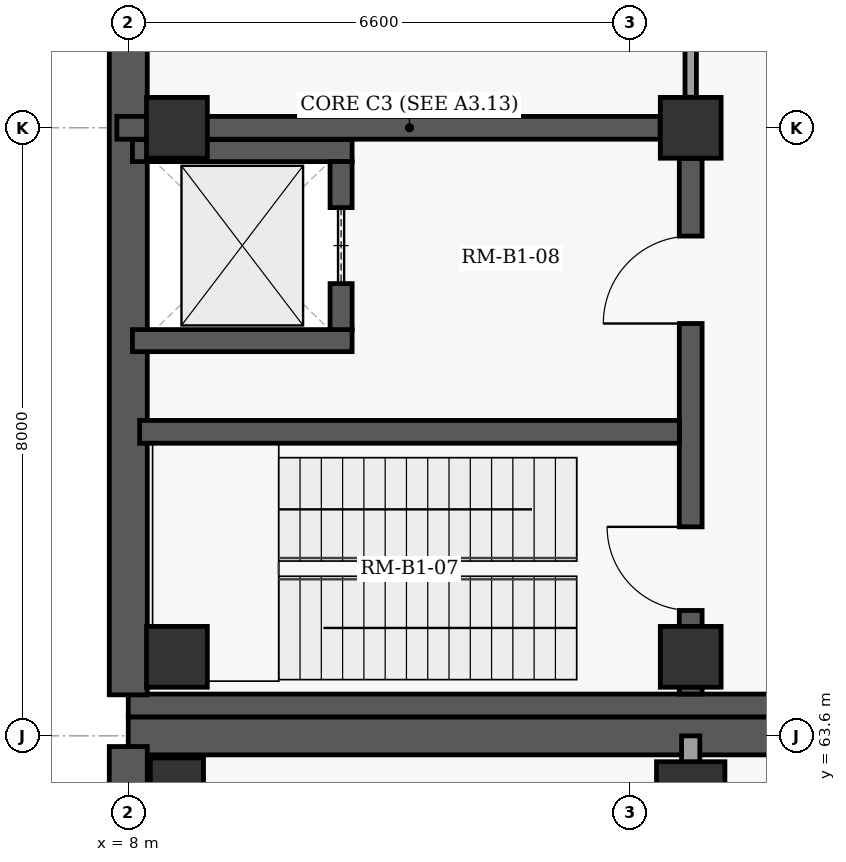
"""IFC4 building model, lengths in metres.
Left out: names, types, materials, properties, quantities, classifications, styles, units other than length and angle.
Written with IfcOpenShell. Run it as: python <this file> out.ifc"""

import sys

from ifc_helpers import new_model, si_unit, direction, frame, frame_2d, origin, origin_2d, place, context, subcontext, project, spatial, rectangle, extrude, element, fill, save


model = new_model("IFC4")
c1 = context("Model", 3, precision=1e-05, world=origin(), true_north=direction((0.0, 1.0)))
c2 = subcontext(c1, "Body", "Model", "MODEL_VIEW")
j1 = project(units=[si_unit("LENGTHUNIT", "METRE"), si_unit("PLANEANGLEUNIT", "RADIAN")], contexts=[c1])
p1 = place(None, origin())
s1 = spatial("IfcSite", under=j1, at=p1, CompositionType="ELEMENT")
p2 = place(p1, origin())
s2 = spatial("IfcBuilding", under=s1, at=p2, CompositionType="ELEMENT")
p3 = place(p2, frame((0.0, 0.0, -4.8)))
s3 = spatial("IfcBuildingStorey", under=s2, at=p3, CompositionType="ELEMENT", Elevation=-4.8)
p4 = place(p3, frame((8.64, 62.96, 0.0), z_axis=(0.0, 0.0, 1.0), x_axis=(1.0, 0.0, 0.0)))
e1 = element("IfcColumn", 1, at=p4, inside=s3, PredefinedType="COLUMN", context=c2, shape_type="SweptSolid", body=[
    extrude(rectangle(XDim=0.7, YDim=0.7, at=origin_2d()), origin(), (0.0, 0.0, 1.0), 4.8),
])
p5 = place(p3, frame((15.4, 62.96, 0.0), z_axis=(0.0, 0.0, 1.0), x_axis=(1.0, 0.0, 0.0)))
e2 = element("IfcColumn", 2, at=p5, inside=s3, PredefinedType="COLUMN", context=c2, shape_type="SweptSolid", body=[
    extrude(rectangle(XDim=0.6, YDim=0.9, at=origin_2d()), origin(), (0.0, 0.0, 1.0), 4.8),
])
for number, where, z_axis, x_axis in (
    (3, (8.64, 64.64, 0.0), (0.0, 0.0, 1.0), (1.0, 0.0, 0.0)),
    (4, (8.64, 71.6, 0.0), (0.0, 0.0, 1.0), (1.0, 0.0, 0.0)),
    (5, (15.4, 64.64, 0.0), (0.0, 0.0, 1.0), (1.0, 0.0, 0.0)),
    (6, (15.4, 71.6, 0.0), (0.0, 0.0, 1.0), (1.0, 0.0, 0.0)),
):
    element("IfcColumn", number, at=place(p3, frame(where, z_axis=z_axis, x_axis=x_axis)), inside=s3, PredefinedType="COLUMN", context=c2, shape_type="SweptSolid", body=[
        extrude(rectangle(XDim=0.8, YDim=0.8, at=origin_2d()), origin(), (0.0, 0.0, 1.0), 4.8),
    ])
p6 = place(p3, frame((8.0, 63.6, 0.0), z_axis=(0.0, 0.0, 1.0), x_axis=(1.0, 0.0, 0.0)))
e7 = element("IfcWall", 7, at=p6, inside=s3, PredefinedType="USERDEFINED", context=c2, shape_type="SweptSolid", body=[
    extrude(rectangle(XDim=38.0, YDim=0.5, at=frame_2d((19.0, 0.0))), origin(), (0.0, 0.0, 1.0), 4.5),
])
p7 = place(p3, frame((8.0, 7.74, 0.0), z_axis=(0.0, 0.0, 1.0), x_axis=(0.0, 1.0, 0.0)))
e8 = element("IfcWall", 8, at=p7, inside=s3, PredefinedType="USERDEFINED", context=c2, shape_type="SweptSolid", body=[
    extrude(rectangle(XDim=55.72, YDim=0.5, at=frame_2d((27.86, 0.0))), origin(), (0.0, 0.0, 1.0), 4.5),
])
p8 = place(p3, frame((40.2, 64.0, 0.0), z_axis=(0.0, 0.0, 1.0), x_axis=(-1.0, 0.0, 0.0)))
e9 = element("IfcWall", 9, at=p8, inside=s3, PredefinedType="SHEAR", context=c2, shape_type="SweptSolid", body=[
    extrude(rectangle(XDim=32.2, YDim=0.3, at=frame_2d((16.1, 0.0))), origin(), (0.0, 0.0, 1.0), 4.5),
])
p9 = place(p3, frame((8.0, 64.14, 0.0), z_axis=(0.0, 0.0, 1.0), x_axis=(0.0, 1.0, 0.0)))
e10 = element("IfcWall", 10, at=p9, inside=s3, PredefinedType="USERDEFINED", context=c2, shape_type="SweptSolid", body=[
    extrude(rectangle(XDim=29.72, YDim=0.5, at=frame_2d((14.86, 0.0))), origin(), (0.0, 0.0, 1.0), 4.5),
])
p10 = place(p3, frame((7.85, 71.6, 0.0), z_axis=(0.0, 0.0, 1.0), x_axis=(1.0, 0.0, 0.0)))
e11 = element("IfcWall", 11, at=p10, inside=s3, PredefinedType="SHEAR", context=c2, shape_type="SweptSolid", body=[
    extrude(rectangle(XDim=7.148, YDim=0.3, at=frame_2d((3.574, 0.0))), origin(), (0.0, 0.0, 1.0), 4.5),
])
p11 = place(p3, frame((15.4, 64.15, 0.0), z_axis=(0.0, 0.0, 1.0), x_axis=(0.0, 1.0, 0.0)))
e12 = element("IfcWall", 12, at=p11, inside=s3, PredefinedType="SHEAR", context=c2, shape_type="SweptSolid", body=[
    extrude(rectangle(XDim=7.048, YDim=0.3, at=frame_2d((3.524, 0.0))), origin(), (0.0, 0.0, 1.0), 4.5),
])
p12 = place(p11, frame((1.1, 0.0, 0.0)))
e13 = element("IfcOpeningElement", 13, at=p12, cuts=e12, PredefinedType="OPENING", context=c2, shape_type="SweptSolid", body=[
    extrude(rectangle(XDim=1.1, YDim=2.15, at=frame_2d((0.55, 1.075))), frame((0.0, 0.16, 0.0), z_axis=(0.0, -1.0, 0.0), x_axis=(1.0, 0.0, 0.0)), (0.0, 0.0, 1.0), 0.32),
])
p13 = place(p11, frame((4.875, 0.0, 0.0)))
e14 = element("IfcOpeningElement", 14, at=p13, cuts=e12, PredefinedType="OPENING", context=c2, shape_type="SweptSolid", body=[
    extrude(rectangle(XDim=1.15, YDim=2.2, at=frame_2d((0.575, 1.1))), frame((0.0, 0.16, 0.0), z_axis=(0.0, -1.0, 0.0), x_axis=(1.0, 0.0, 0.0)), (0.0, 0.0, 1.0), 0.32),
])
p14 = place(p3, frame((8.15, 67.6, 0.0), z_axis=(0.0, 0.0, 1.0), x_axis=(1.0, 0.0, 0.0)))
e15 = element("IfcWall", 15, at=p14, inside=s3, PredefinedType="SHEAR", context=c2, shape_type="SweptSolid", body=[
    extrude(rectangle(XDim=7.1, YDim=0.3, at=frame_2d((3.55, 0.0))), origin(), (0.0, 0.0, 1.0), 4.5),
])
for number, where, z_axis, x_axis in (
    (16, (8.055, 68.8, 0.0), (0.0, 0.0, 1.0), (1.0, 0.0, 0.0)),
    (17, (8.055, 71.3, 0.0), (0.0, 0.0, 1.0), (1.0, 0.0, 0.0)),
):
    element("IfcWall", number, at=place(p3, frame(where, z_axis=z_axis, x_axis=x_axis)), inside=s3, PredefinedType="SHEAR", context=c2, shape_type="SweptSolid", body=[
        extrude(rectangle(XDim=2.89, YDim=0.29, at=frame_2d((1.445, 0.0))), origin(), (0.0, 0.0, 1.0), 4.5),
    ])
p15 = place(p3, frame((10.8, 68.945, 0.0), z_axis=(0.0, 0.0, 1.0), x_axis=(0.0, 1.0, 0.0)))
e18 = element("IfcWall", 18, at=p15, inside=s3, PredefinedType="SHEAR", context=c2, shape_type="SweptSolid", body=[
    extrude(rectangle(XDim=2.21, YDim=0.29, at=frame_2d((1.105, 0.0))), origin(), (0.0, 0.0, 1.0), 4.5),
])
p16 = place(p15, frame((0.605, 0.0, 0.0)))
e19 = element("IfcOpeningElement", 19, at=p16, cuts=e18, PredefinedType="OPENING", context=c2, shape_type="SweptSolid", body=[
    extrude(rectangle(XDim=1.0, YDim=2.15, at=frame_2d((0.5, 1.075))), frame((0.0, 0.155, 0.0), z_axis=(0.0, -1.0, 0.0), x_axis=(1.0, 0.0, 0.0)), (0.0, 0.0, 1.0), 0.31),
])
p17 = place(p3, frame((15.4, 44.0, 0.0), z_axis=(0.0, 0.0, 1.0), x_axis=(0.0, 1.0, 0.0)))
e20 = element("IfcWall", 20, at=p17, inside=s3, PredefinedType="PARTITIONING", context=c2, shape_type="SweptSolid", body=[
    extrude(rectangle(XDim=19.6, YDim=0.24, at=frame_2d((9.8, 0.0))), origin(), (0.0, 0.0, 1.0), 3.65),
])
p18 = place(p17, frame((9.26, 0.0, 0.0)))
e21 = element("IfcOpeningElement", 21, at=p18, cuts=e20, PredefinedType="OPENING", context=c2, shape_type="SweptSolid", body=[
    extrude(rectangle(XDim=1.08, YDim=2.15, at=frame_2d((0.54, 1.075))), frame((0.0, 0.13, 0.0), z_axis=(0.0, -1.0, 0.0), x_axis=(1.0, 0.0, 0.0)), (0.0, 0.0, 1.0), 0.26),
])
p19 = place(p3, frame((15.4, 72.002, 0.0), z_axis=(0.0, 0.0, 1.0), x_axis=(0.0, 1.0, 0.0)))
e22 = element("IfcWall", 22, at=p19, inside=s3, PredefinedType="PARTITIONING", context=c2, shape_type="SweptSolid", body=[
    extrude(rectangle(XDim=10.998, YDim=0.15, at=frame_2d((5.499, 0.0))), origin(), (0.0, 0.0, 1.0), 3.65),
])
p20 = place(p19, frame((4.674, 0.0, 0.0)))
e23 = element("IfcOpeningElement", 23, at=p20, cuts=e22, PredefinedType="OPENING", context=c2, shape_type="SweptSolid", body=[
    extrude(rectangle(XDim=1.65, YDim=2.3, at=frame_2d((0.825, 1.15))), frame((0.0, 0.085, 0.0), z_axis=(0.0, -1.0, 0.0), x_axis=(1.0, 0.0, 0.0)), (0.0, 0.0, 1.0), 0.17),
])
p21 = place(p12, origin())
e24 = element("IfcDoor", 24, at=p21, inside=s3, OperationType="SINGLE_SWING_RIGHT", PredefinedType="DOOR", context=c2, shape_type="SweptSolid", body=[
    extrude(rectangle(XDim=1.1, YDim=2.15, at=frame_2d((0.55, 1.075))), frame((0.0, 0.025, 0.0), z_axis=(0.0, -1.0, 0.0), x_axis=(1.0, 0.0, 0.0)), (0.0, 0.0, 1.0), 0.05),
])
fill(e13, e24)
p22 = place(p13, origin())
e25 = element("IfcDoor", 25, at=p22, inside=s3, OperationType="SINGLE_SWING_LEFT", PredefinedType="DOOR", context=c2, shape_type="SweptSolid", body=[
    extrude(rectangle(XDim=1.15, YDim=2.2, at=frame_2d((0.575, 1.1))), frame((0.0, 0.025, 0.0), z_axis=(0.0, -1.0, 0.0), x_axis=(1.0, 0.0, 0.0)), (0.0, 0.0, 1.0), 0.05),
])
fill(e14, e25)
p23 = place(p16, origin())
e26 = element("IfcDoor", 26, at=p23, inside=s3, OperationType="SLIDING_TO_LEFT", PredefinedType="DOOR", context=c2, shape_type="SweptSolid", body=[
    extrude(rectangle(XDim=1.0, YDim=2.15, at=frame_2d((0.5, 1.075))), frame((0.0, 0.025, 0.0), z_axis=(0.0, -1.0, 0.0), x_axis=(1.0, 0.0, 0.0)), (0.0, 0.0, 1.0), 0.05),
])
fill(e19, e26)
save(model, sys.argv[1])
